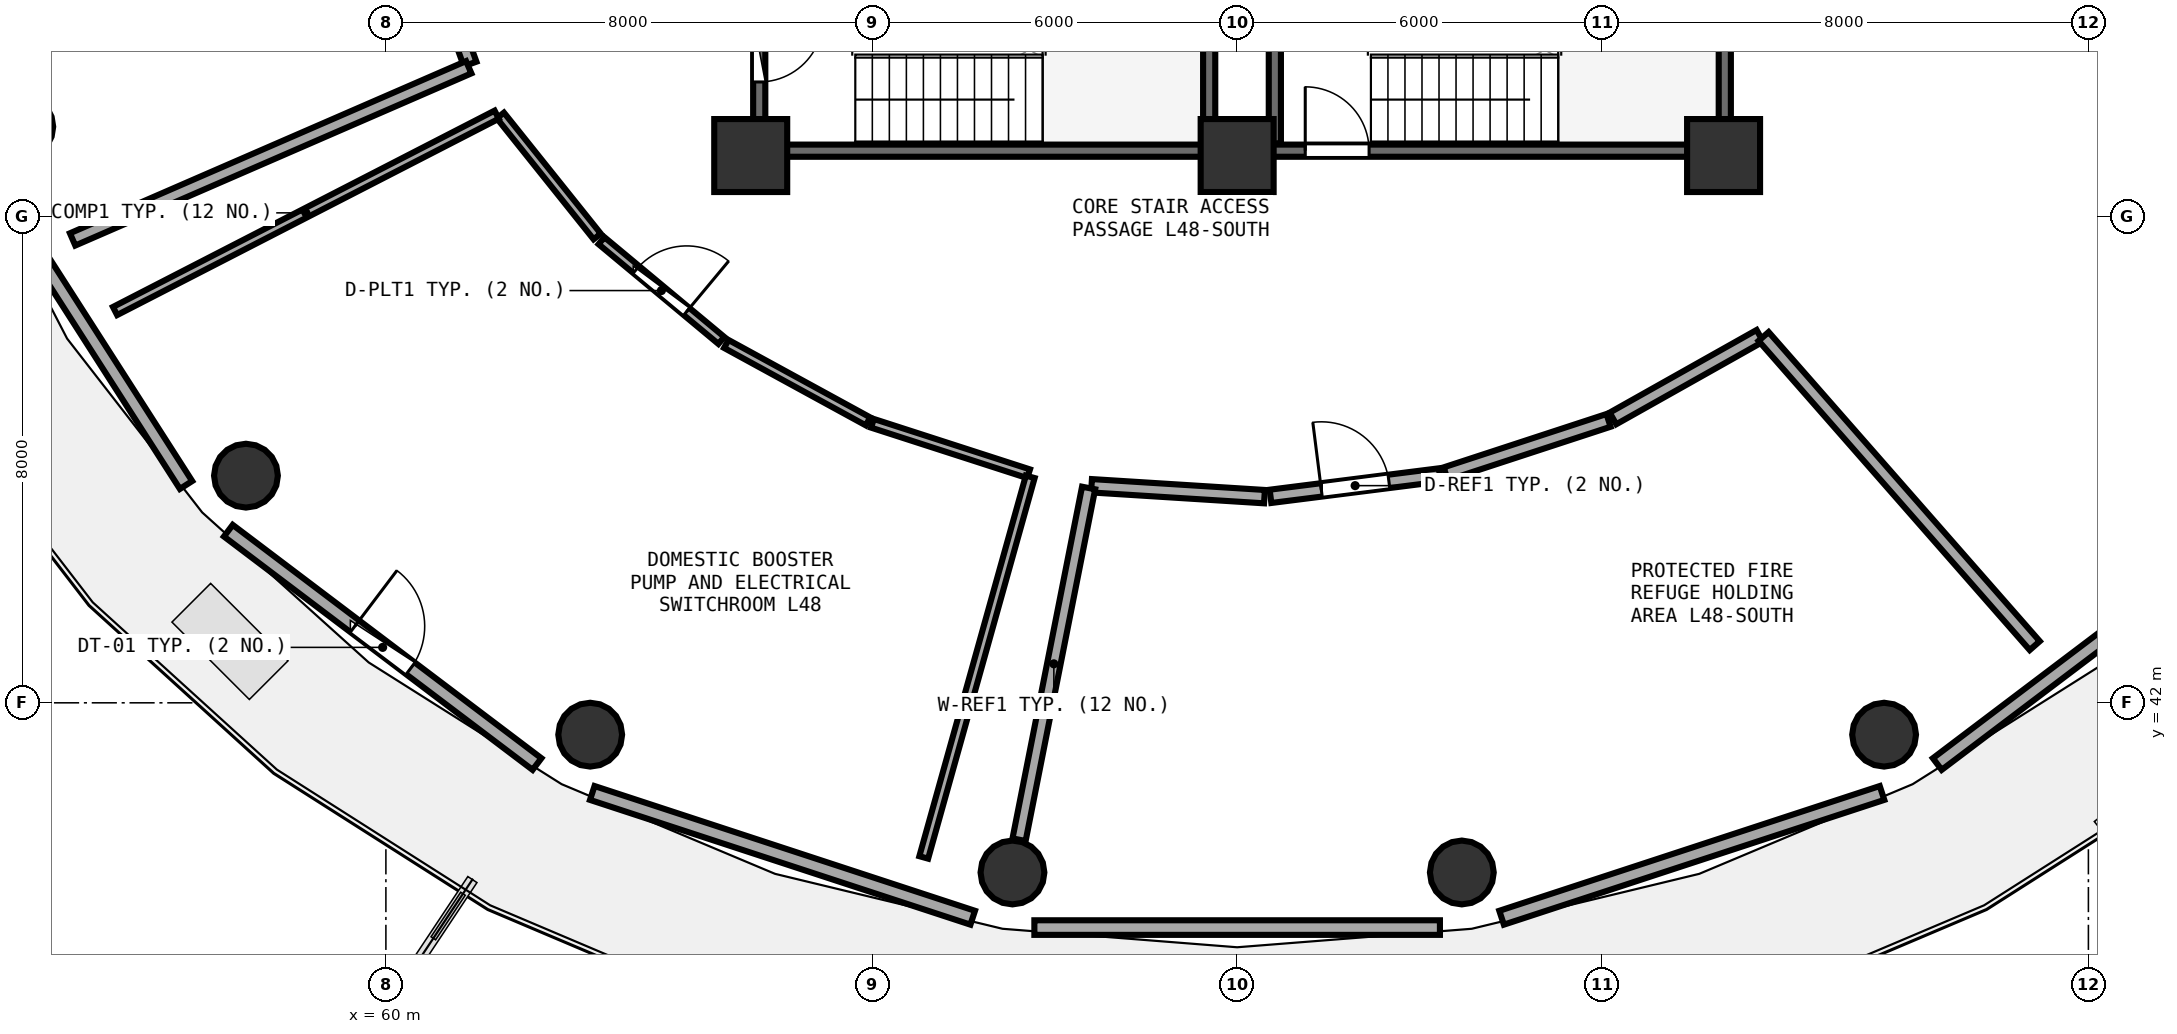
"""IFC4 building model, lengths in metres.
Left out: names, types, materials, properties, quantities, classifications, styles, units other than length and angle.
Written with IfcOpenShell. Run it as: python <this file> out.ifc"""

import sys

from ifc_helpers import new_model, si_unit, direction, frame, frame_2d, origin, origin_2d, place, context, subcontext, project, spatial, rectangle, circle, extrude, element, fill, save


model = new_model("IFC4")
c1 = context("Model", 3, precision=1e-05, world=origin(), true_north=direction((0.0, 1.0)))
c2 = subcontext(c1, "Body", "Model", "MODEL_VIEW")
j1 = project(units=[si_unit("LENGTHUNIT", "METRE"), si_unit("PLANEANGLEUNIT", "RADIAN")], contexts=[c1])
p1 = place(None, origin())
s1 = spatial("IfcSite", under=j1, at=p1, CompositionType="ELEMENT")
p2 = place(p1, origin())
s2 = spatial("IfcBuilding", under=s1, at=p2, CompositionType="ELEMENT")
p3 = place(p2, frame((0.0, 0.0, 189.11)))
s3 = spatial("IfcBuildingStorey", under=s2, at=p3, CompositionType="ELEMENT", Elevation=189.11)
for number, where, z_axis, x_axis in (
    (1, (66.0, 51.0, 0.0), (0.0, 0.0, 1.0), (1.0, 0.0, 0.0)),
    (2, (74.0, 51.0, 0.0), (0.0, 0.0, 1.0), (1.0, 0.0, 0.0)),
    (3, (82.0, 51.0, 0.0), (0.0, 0.0, 1.0), (1.0, 0.0, 0.0)),
):
    element("IfcColumn", number, at=place(p3, frame(where, z_axis=z_axis, x_axis=x_axis)), inside=s3, PredefinedType="PILASTER", context=c2, shape_type="SweptSolid", body=[
        extrude(rectangle(XDim=1.2, YDim=1.2, at=origin_2d()), origin(), (0.0, 0.0, 1.0), 4.09),
    ])
for number, where, z_axis, x_axis in (
    (4, (54.003, 51.474, 0.0), (0.0, 0.0, 1.0), (1.0, 0.0, 0.0)),
    (5, (57.698, 45.736, 0.0), (0.0, 0.0, 1.0), (1.0, 0.0, 0.0)),
    (6, (63.36, 41.476, 0.0), (0.0, 0.0, 1.0), (1.0, 0.0, 0.0)),
    (7, (70.305, 39.21, 0.0), (0.0, 0.0, 1.0), (1.0, 0.0, 0.0)),
    (8, (77.695, 39.21, 0.0), (0.0, 0.0, 1.0), (1.0, 0.0, 0.0)),
    (9, (84.64, 41.476, 0.0), (0.0, 0.0, 1.0), (1.0, 0.0, 0.0)),
):
    element("IfcColumn", number, at=place(p3, frame(where, z_axis=z_axis, x_axis=x_axis)), inside=s3, PredefinedType="COLUMN", context=c2, shape_type="SweptSolid", body=[
        extrude(circle(Radius=0.525, at=origin_2d()), origin(), (0.0, 0.0, 1.0), 4.09),
    ])
p4 = place(p3, frame((53.419, 50.722, 0.0), z_axis=(0.0, 0.0, 1.0), x_axis=(0.539556360139, -0.841949484371, 0.0)))
e10 = element("IfcWall", 10, at=p4, inside=s3, PredefinedType="SOLIDWALL", context=c2, shape_type="SweptSolid", body=[
    extrude(rectangle(XDim=6.104, YDim=0.24, at=frame_2d((3.052, 0.0))), origin(), (0.0, 0.0, 1.0), 3.815),
])
p5 = place(p3, frame((57.409, 44.831, 0.0), z_axis=(0.0, 0.0, 1.0), x_axis=(0.797724599481, -0.603021942704, 0.0)))
e11 = element("IfcWall", 11, at=p5, inside=s3, PredefinedType="SOLIDWALL", context=c2, shape_type="SweptSolid", body=[
    extrude(rectangle(XDim=6.364, YDim=0.24, at=frame_2d((3.182, 0.0))), origin(), (0.0, 0.0, 1.0), 3.815),
])
p6 = place(p5, frame((2.607, 0.0, 0.0)))
e12 = element("IfcOpeningElement", 12, at=p6, cuts=e11, PredefinedType="OPENING", context=c2, shape_type="SweptSolid", body=[
    extrude(rectangle(XDim=1.15, YDim=2.15, at=frame_2d((0.575, 1.075))), frame((0.0, 0.13, 0.0), z_axis=(0.0, -1.0, 0.0), x_axis=(1.0, 0.0, 0.0)), (0.0, 0.0, 1.0), 0.26),
])
p7 = place(p3, frame((63.394, 40.518, 0.0), z_axis=(0.0, 0.0, 1.0), x_axis=(0.950214424667, -0.31159677013, 0.0)))
e13 = element("IfcWall", 13, at=p7, inside=s3, PredefinedType="SOLIDWALL", context=c2, shape_type="SweptSolid", body=[
    extrude(rectangle(XDim=6.585, YDim=0.24, at=frame_2d((3.292, 0.0))), origin(), (0.0, 0.0, 1.0), 3.815),
])
p8 = place(p3, frame((70.665, 38.304, 0.0), z_axis=(0.0, 0.0, 1.0), x_axis=(1.0, 0.0, 0.0)))
e14 = element("IfcWall", 14, at=p8, inside=s3, PredefinedType="SOLIDWALL", context=c2, shape_type="SweptSolid", body=[
    extrude(rectangle(XDim=6.67, YDim=0.24, at=frame_2d((3.335, 0.0))), origin(), (0.0, 0.0, 1.0), 3.815),
])
p9 = place(p3, frame((78.349, 38.466, 0.0), z_axis=(0.0, 0.0, 1.0), x_axis=(0.950214424667, 0.31159677013, 0.0)))
e15 = element("IfcWall", 15, at=p9, inside=s3, PredefinedType="SOLIDWALL", context=c2, shape_type="SweptSolid", body=[
    extrude(rectangle(XDim=6.585, YDim=0.24, at=frame_2d((3.292, 0.0))), origin(), (0.0, 0.0, 1.0), 3.815),
])
p10 = place(p3, frame((85.515, 40.993, 0.0), z_axis=(0.0, 0.0, 1.0), x_axis=(0.797724599481, 0.603021942704, 0.0)))
e16 = element("IfcWall", 16, at=p10, inside=s3, PredefinedType="SOLIDWALL", context=c2, shape_type="SweptSolid", body=[
    extrude(rectangle(XDim=6.364, YDim=0.24, at=frame_2d((3.182, 0.0))), origin(), (0.0, 0.0, 1.0), 3.815),
])
p11 = place(p3, frame((74.0, 51.08, 0.0), z_axis=(0.0, 0.0, 1.0), x_axis=(1.0, 0.0, 0.0)))
e17 = element("IfcWall", 17, at=p11, inside=s3, PredefinedType="SHEAR", context=c2, shape_type="SweptSolid", body=[
    extrude(rectangle(XDim=7.9, YDim=0.2, at=frame_2d((3.95, 0.0))), origin(), (0.0, 0.0, 1.0), 3.83),
])
p12 = place(p11, frame((1.12, 0.0, 0.0)))
e18 = element("IfcOpeningElement", 18, at=p12, cuts=e17, PredefinedType="OPENING", context=c2, shape_type="SweptSolid", body=[
    extrude(rectangle(XDim=1.05, YDim=2.1, at=frame_2d((0.525, 1.05))), frame((0.0, 0.11, 0.0), z_axis=(0.0, -1.0, 0.0), x_axis=(1.0, 0.0, 0.0)), (0.0, 0.0, 1.0), 0.22),
])
for number, where, z_axis, x_axis in (
    (19, (82.02, 51.2, 0.0), (0.0, 0.0, 1.0), (0.0, 1.0, 0.0)),
    (20, (74.62, 54.27, 0.0), (0.0, 0.0, 1.0), (0.0, -1.0, 0.0)),
):
    element("IfcWall", number, at=place(p3, frame(where, z_axis=z_axis, x_axis=x_axis)), inside=s3, PredefinedType="SHEAR", context=c2, shape_type="SweptSolid", body=[
        extrude(rectangle(XDim=3.07, YDim=0.2, at=frame_2d((1.535, 0.0))), origin(), (0.0, 0.0, 1.0), 3.83),
    ])
p13 = place(p3, frame((66.26, 51.08, 0.0), z_axis=(0.0, 0.0, 1.0), x_axis=(1.0, 0.0, 0.0)))
e21 = element("IfcWall", 21, at=p13, inside=s3, PredefinedType="SHEAR", context=c2, shape_type="SweptSolid", body=[
    extrude(rectangle(XDim=7.16, YDim=0.2, at=frame_2d((3.58, 0.0))), origin(), (0.0, 0.0, 1.0), 3.83),
])
p14 = place(p3, frame((73.54, 51.2, 0.0), z_axis=(0.0, 0.0, 1.0), x_axis=(0.0, 1.0, 0.0)))
e22 = element("IfcWall", 22, at=p14, inside=s3, PredefinedType="SHEAR", context=c2, shape_type="SweptSolid", body=[
    extrude(rectangle(XDim=3.07, YDim=0.2, at=frame_2d((1.535, 0.0))), origin(), (0.0, 0.0, 1.0), 3.83),
])
p15 = place(p3, frame((66.14, 54.27, 0.0), z_axis=(0.0, 0.0, 1.0), x_axis=(0.0, -1.0, 0.0)))
e23 = element("IfcWall", 23, at=p15, inside=s3, PredefinedType="SHEAR", context=c2, shape_type="SweptSolid", body=[
    extrude(rectangle(XDim=3.07, YDim=0.2, at=frame_2d((1.535, 0.0))), origin(), (0.0, 0.0, 1.0), 3.83),
])
p16 = place(p15, frame((1.01, 0.0, 0.0)))
e24 = element("IfcOpeningElement", 24, at=p16, cuts=e23, PredefinedType="OPENING", context=c2, shape_type="SweptSolid", body=[
    extrude(rectangle(XDim=1.05, YDim=2.1, at=frame_2d((0.525, 1.05))), frame((0.0, 0.11, 0.0), z_axis=(0.0, -1.0, 0.0), x_axis=(1.0, 0.0, 0.0)), (0.0, 0.0, 1.0), 0.22),
])
p17 = place(p3, frame((63.546, 49.6, 0.0), z_axis=(0.0, 0.0, 1.0), x_axis=(0.768626986837, -0.639697237063, 0.0)))
e25 = element("IfcWall", 25, at=p17, inside=s3, PredefinedType="PARTITIONING", context=c2, shape_type="SweptSolid", body=[
    extrude(rectangle(XDim=2.564, YDim=0.15, at=frame_2d((1.282, 0.0))), origin(), (0.0, 0.0, 1.0), 3.365),
])
p18 = place(p17, frame((0.742, 0.0, 0.0)))
e26 = element("IfcOpeningElement", 26, at=p18, cuts=e25, PredefinedType="OPENING", context=c2, shape_type="SweptSolid", body=[
    extrude(rectangle(XDim=1.08, YDim=2.1, at=frame_2d((0.54, 1.05))), frame((0.0, 0.085, 0.0), z_axis=(0.0, -1.0, 0.0), x_axis=(1.0, 0.0, 0.0)), (0.0, 0.0, 1.0), 0.17),
])
p19 = place(p3, frame((74.549, 45.396, 0.0), z_axis=(0.0, 0.0, 1.0), x_axis=(0.992098832507, 0.125458784221, 0.0)))
e27 = element("IfcWall", 27, at=p19, inside=s3, PredefinedType="SOLIDWALL", context=c2, shape_type="SweptSolid", body=[
    extrude(rectangle(XDim=2.806, YDim=0.22, at=frame_2d((1.403, 0.0))), origin(), (0.0, 0.0, 1.0), 3.365),
])
p20 = place(p19, frame((0.843, 0.0, 0.0)))
e28 = element("IfcOpeningElement", 28, at=p20, cuts=e27, PredefinedType="OPENING", context=c2, shape_type="SweptSolid", body=[
    extrude(rectangle(XDim=1.12, YDim=2.1, at=frame_2d((0.56, 1.05))), frame((0.0, 0.12, 0.0), z_axis=(0.0, -1.0, 0.0), x_axis=(1.0, 0.0, 0.0)), (0.0, 0.0, 1.0), 0.24),
])
p21 = place(p3, frame((60.207, 55.771, 0.0), z_axis=(0.0, 0.0, 1.0), x_axis=(0.339545974416, -0.940589459466, 0.0)))
e29 = element("IfcWall", 29, at=p21, inside=s3, PredefinedType="SOLIDWALL", context=c2, shape_type="SweptSolid", body=[
    extrude(rectangle(XDim=3.472, YDim=0.22, at=frame_2d((1.736, 0.0))), origin(), (0.0, 0.0, 1.0), 3.575),
])
p22 = place(p3, frame((61.362, 52.452, 0.0), z_axis=(0.0, 0.0, 1.0), x_axis=(-0.917129606151, -0.398589118668, 0.0)))
e30 = element("IfcWall", 30, at=p22, inside=s3, PredefinedType="SOLIDWALL", context=c2, shape_type="SweptSolid", body=[
    extrude(rectangle(XDim=7.103, YDim=0.22, at=frame_2d((3.552, 0.0))), origin(), (0.0, 0.0, 1.0), 3.365),
])
p23 = place(p3, frame((61.883, 51.659, 0.0), z_axis=(0.0, 0.0, 1.0), x_axis=(0.62480020311, -0.780784673385, 0.0)))
e31 = element("IfcWall", 31, at=p23, inside=s3, PredefinedType="PARTITIONING", context=c2, shape_type="SweptSolid", body=[
    extrude(rectangle(XDim=2.548, YDim=0.15, at=frame_2d((1.274, 0.0))), origin(), (0.0, 0.0, 1.0), 3.365),
])
p24 = place(p3, frame((65.598, 47.902, 0.0), z_axis=(0.0, 0.0, 1.0), x_axis=(0.877526475728, -0.479528189366, 0.0)))
e32 = element("IfcWall", 32, at=p24, inside=s3, PredefinedType="PARTITIONING", context=c2, shape_type="SweptSolid", body=[
    extrude(rectangle(XDim=2.656, YDim=0.15, at=frame_2d((1.328, 0.0))), origin(), (0.0, 0.0, 1.0), 3.575),
])
p25 = place(p3, frame((68.002, 46.597, 0.0), z_axis=(0.0, 0.0, 1.0), x_axis=(0.951591716266, -0.307364938686, 0.0)))
e33 = element("IfcWall", 33, at=p25, inside=s3, PredefinedType="PARTITIONING", context=c2, shape_type="SweptSolid", body=[
    extrude(rectangle(XDim=2.698, YDim=0.15, at=frame_2d((1.349, 0.0))), origin(), (0.0, 0.0, 1.0), 3.82),
])
p26 = place(p3, frame((70.597, 45.717, 0.0), z_axis=(0.0, 0.0, 1.0), x_axis=(-0.26947805334, -0.96300653101, 0.0)))
e34 = element("IfcWall", 34, at=p26, inside=s3, PredefinedType="PARTITIONING", context=c2, shape_type="SweptSolid", body=[
    extrude(rectangle(XDim=6.5, YDim=0.15, at=frame_2d((3.25, 0.0))), origin(), (0.0, 0.0, 1.0), 3.415),
])
p27 = place(p3, frame((55.546, 48.443, 0.0), z_axis=(0.0, 0.0, 1.0), x_axis=(0.889277753714, 0.457367551045, 0.0)))
e35 = element("IfcWall", 35, at=p27, inside=s3, PredefinedType="PARTITIONING", context=c2, shape_type="SweptSolid", body=[
    extrude(rectangle(XDim=7.058, YDim=0.15, at=frame_2d((3.529, 0.0))), origin(), (0.0, 0.0, 1.0), 3.365),
])
p28 = place(p3, frame((71.605, 45.57, 0.0), z_axis=(0.0, 0.0, 1.0), x_axis=(0.998021119096, -0.062879613855, 0.0)))
e36 = element("IfcWall", 36, at=p28, inside=s3, PredefinedType="SOLIDWALL", context=c2, shape_type="SweptSolid", body=[
    extrude(rectangle(XDim=2.85, YDim=0.22, at=frame_2d((1.425, 0.0))), origin(), (0.0, 0.0, 1.0), 3.365),
])
p29 = place(p3, frame((77.43, 45.768, 0.0), z_axis=(0.0, 0.0, 1.0), x_axis=(0.950342166159, 0.311206952397, 0.0)))
e37 = element("IfcWall", 37, at=p29, inside=s3, PredefinedType="SOLIDWALL", context=c2, shape_type="SweptSolid", body=[
    extrude(rectangle(XDim=2.818, YDim=0.22, at=frame_2d((1.409, 0.0))), origin(), (0.0, 0.0, 1.0), 3.82),
])
p30 = place(p3, frame((80.181, 46.677, 0.0), z_axis=(0.0, 0.0, 1.0), x_axis=(0.87161551792, 0.49019015588, 0.0)))
e38 = element("IfcWall", 38, at=p30, inside=s3, PredefinedType="SOLIDWALL", context=c2, shape_type="SweptSolid", body=[
    extrude(rectangle(XDim=2.772, YDim=0.22, at=frame_2d((1.386, 0.0))), origin(), (0.0, 0.0, 1.0), 3.365),
])
p31 = place(p3, frame((82.658, 48.025, 0.0), z_axis=(0.0, 0.0, 1.0), x_axis=(0.659350124836, -0.75183602792, 0.0)))
e39 = element("IfcWall", 39, at=p31, inside=s3, PredefinedType="SOLIDWALL", context=c2, shape_type="SweptSolid", body=[
    extrude(rectangle(XDim=6.763, YDim=0.22, at=frame_2d((3.382, 0.0))), origin(), (0.0, 0.0, 1.0), 3.365),
])
p32 = place(p3, frame((70.413, 39.749, 0.0), z_axis=(0.0, 0.0, 1.0), x_axis=(0.194005368902, 0.981000467297, 0.0)))
e40 = element("IfcWall", 40, at=p32, inside=s3, PredefinedType="SOLIDWALL", context=c2, shape_type="SweptSolid", body=[
    extrude(rectangle(XDim=5.896, YDim=0.22, at=frame_2d((2.948, 0.0))), origin(), (0.0, 0.0, 1.0), 3.365),
])
p33 = place(p6, frame((1.15, 0.0, 0.0), z_axis=(0.0, 0.0, 1.0), x_axis=(-1.0, 0.0, 0.0)))
e41 = element("IfcDoor", 41, at=p33, inside=s3, OperationType="SINGLE_SWING_RIGHT", PredefinedType="DOOR", context=c2, shape_type="SweptSolid", body=[
    extrude(rectangle(XDim=1.15, YDim=2.15, at=frame_2d((0.575, 1.075))), frame((0.0, 0.025, 0.0), z_axis=(0.0, -1.0, 0.0), x_axis=(1.0, 0.0, 0.0)), (0.0, 0.0, 1.0), 0.05),
])
fill(e12, e41)
p34 = place(p12, origin())
e42 = element("IfcDoor", 42, at=p34, inside=s3, OperationType="SINGLE_SWING_LEFT", PredefinedType="DOOR", context=c2, shape_type="SweptSolid", body=[
    extrude(rectangle(XDim=1.05, YDim=2.1, at=frame_2d((0.525, 1.05))), frame((0.0, 0.025, 0.0), z_axis=(0.0, -1.0, 0.0), x_axis=(1.0, 0.0, 0.0)), (0.0, 0.0, 1.0), 0.05),
])
fill(e18, e42)
p35 = place(p16, origin())
e43 = element("IfcDoor", 43, at=p35, inside=s3, OperationType="SINGLE_SWING_LEFT", PredefinedType="DOOR", context=c2, shape_type="SweptSolid", body=[
    extrude(rectangle(XDim=1.05, YDim=2.1, at=frame_2d((0.525, 1.05))), frame((0.0, 0.025, 0.0), z_axis=(0.0, -1.0, 0.0), x_axis=(1.0, 0.0, 0.0)), (0.0, 0.0, 1.0), 0.05),
])
fill(e24, e43)
p36 = place(p18, origin())
e44 = element("IfcDoor", 44, at=p36, inside=s3, OperationType="SINGLE_SWING_RIGHT", PredefinedType="DOOR", context=c2, shape_type="SweptSolid", body=[
    extrude(rectangle(XDim=1.08, YDim=2.1, at=frame_2d((0.54, 1.05))), frame((0.0, 0.025, 0.0), z_axis=(0.0, -1.0, 0.0), x_axis=(1.0, 0.0, 0.0)), (0.0, 0.0, 1.0), 0.05),
])
fill(e26, e44)
p37 = place(p20, origin())
e45 = element("IfcDoor", 45, at=p37, inside=s3, OperationType="SINGLE_SWING_LEFT", PredefinedType="DOOR", context=c2, shape_type="SweptSolid", body=[
    extrude(rectangle(XDim=1.12, YDim=2.1, at=frame_2d((0.56, 1.05))), frame((0.0, 0.025, 0.0), z_axis=(0.0, -1.0, 0.0), x_axis=(1.0, 0.0, 0.0)), (0.0, 0.0, 1.0), 0.05),
])
fill(e28, e45)
save(model, sys.argv[1])
